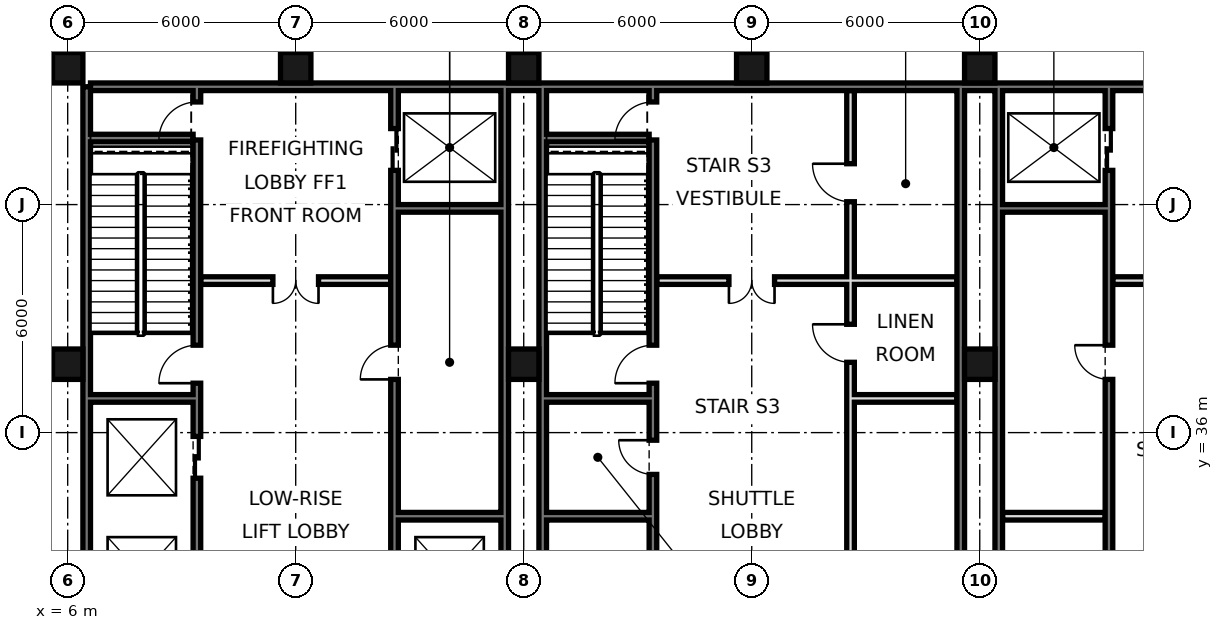
"""IFC4 building model, lengths in metres.
Left out: names, types, materials, properties, quantities, classifications, styles, units other than length and angle.
Written with IfcOpenShell. Run it as: python <this file> out.ifc"""

import sys

from ifc_helpers import new_model, si_unit, direction, frame, frame_2d, origin, origin_2d, place, context, subcontext, project, spatial, rectangle, hollow_rectangle, extrude, element, fill, save


model = new_model("IFC4")
c1 = context("Model", 3, precision=1e-05, world=origin(), true_north=direction((0.0, 1.0)))
c2 = subcontext(c1, "Body", "Model", "MODEL_VIEW")
j1 = project(units=[si_unit("LENGTHUNIT", "METRE"), si_unit("PLANEANGLEUNIT", "RADIAN")], contexts=[c1])
p1 = place(None, origin())
s1 = spatial("IfcSite", under=j1, at=p1, CompositionType="ELEMENT")
p2 = place(p1, origin())
s2 = spatial("IfcBuilding", under=s1, at=p2, CompositionType="ELEMENT")
p3 = place(p2, frame((0.0, 0.0, 44.4)))
s3 = spatial("IfcBuildingStorey", under=s2, at=p3, CompositionType="ELEMENT", Elevation=44.4)
for number, where, z_axis, x_axis in (
    (1, (6.0, 37.8, 0.0), (0.0, 0.0, 1.0), (1.0, 0.0, 0.0)),
    (2, (6.0, 45.6, 0.0), (0.0, 0.0, 1.0), (1.0, 0.0, 0.0)),
    (3, (12.0, 45.6, 0.0), (0.0, 0.0, 1.0), (1.0, 0.0, 0.0)),
    (4, (18.0, 37.8, 0.0), (0.0, 0.0, 1.0), (1.0, 0.0, 0.0)),
    (5, (18.0, 45.6, 0.0), (0.0, 0.0, 1.0), (1.0, 0.0, 0.0)),
    (6, (24.0, 45.6, 0.0), (0.0, 0.0, 1.0), (1.0, 0.0, 0.0)),
    (7, (30.0, 37.8, 0.0), (0.0, 0.0, 1.0), (1.0, 0.0, 0.0)),
    (8, (30.0, 45.6, 0.0), (0.0, 0.0, 1.0), (1.0, 0.0, 0.0)),
):
    element("IfcColumn", number, at=place(p3, frame(where, z_axis=z_axis, x_axis=x_axis)), inside=s3, PredefinedType="COLUMN", context=c2, shape_type="SweptSolid", body=[
        extrude(hollow_rectangle(XDim=0.8, YDim=0.8, WallThickness=0.07, at=origin_2d()), origin(), (0.0, 0.0, 1.0), 5.4),
    ])
p4 = place(p3, frame((5.805, 48.47, 0.0), z_axis=(0.0, 0.0, 1.0), x_axis=(-0.707106781187, -0.707106781187, 0.0)))
e9 = element("IfcWall", 9, at=p4, inside=s3, PredefinedType="SOLIDWALL", context=c2, shape_type="SweptSolid", body=[
    extrude(rectangle(XDim=8.875, YDim=0.3, at=frame_2d((4.438, 0.0))), origin(), (0.0, 0.0, 1.0), 5.22),
])
p5 = place(p4, frame((1.292, 0.0, 0.9)))
e10 = element("IfcOpeningElement", 10, at=p5, cuts=e9, PredefinedType="OPENING", context=c2, shape_type="SweptSolid", body=[
    extrude(rectangle(XDim=1.8, YDim=1.5, at=frame_2d((0.9, 0.75))), frame((0.0, 0.16, 0.0), z_axis=(0.0, -1.0, 0.0), x_axis=(1.0, 0.0, 0.0)), (0.0, 0.0, 1.0), 0.32),
])
p6 = place(p3, frame((6.5, 21.6, 0.0), z_axis=(0.0, 0.0, 1.0), x_axis=(0.0, 1.0, 0.0)))
e11 = element("IfcWall", 11, at=p6, inside=s3, PredefinedType="SOLIDWALL", context=c2, shape_type="SweptSolid", body=[
    extrude(rectangle(XDim=23.5, YDim=0.2, at=frame_2d((11.75, 0.0))), origin(), (0.0, 0.0, 1.0), 5.22),
])
p7 = place(p3, frame((6.6, 45.1, 0.0), z_axis=(0.0, 0.0, 1.0), x_axis=(1.0, 0.0, 0.0)))
e12 = element("IfcWall", 12, at=p7, inside=s3, PredefinedType="SOLIDWALL", context=c2, shape_type="SweptSolid", body=[
    extrude(rectangle(XDim=34.8, YDim=0.2, at=frame_2d((17.4, 0.0))), origin(), (0.0, 0.0, 1.0), 5.22),
])
for number, where, z_axis, x_axis in (
    (13, (17.5, 27.6, 0.0), (0.0, 0.0, 1.0), (0.0, 1.0, 0.0)),
    (14, (18.5, 27.6, 0.0), (0.0, 0.0, 1.0), (0.0, 1.0, 0.0)),
    (15, (29.5, 27.6, 0.0), (0.0, 0.0, 1.0), (0.0, 1.0, 0.0)),
    (16, (30.5, 27.6, 0.0), (0.0, 0.0, 1.0), (0.0, 1.0, 0.0)),
):
    element("IfcWall", number, at=place(p3, frame(where, z_axis=z_axis, x_axis=x_axis)), inside=s3, PredefinedType="SOLIDWALL", context=c2, shape_type="SweptSolid", body=[
        extrude(rectangle(XDim=17.5, YDim=0.2, at=frame_2d((8.75, 0.0))), origin(), (0.0, 0.0, 1.0), 5.22),
    ])
p8 = place(p3, frame((14.6, 27.5, 0.0), z_axis=(0.0, 0.0, 1.0), x_axis=(0.0, 1.0, 0.0)))
e17 = element("IfcWall", 17, at=p8, inside=s3, PredefinedType="SOLIDWALL", context=c2, shape_type="SweptSolid", body=[
    extrude(rectangle(XDim=17.5, YDim=0.2, at=frame_2d((8.75, 0.0))), origin(), (0.0, 0.0, 1.0), 5.22),
])
p9 = place(p8, frame((1.1, 0.0, 0.0)))
e18 = element("IfcOpeningElement", 18, at=p9, cuts=e17, PredefinedType="OPENING", context=c2, shape_type="SweptSolid", body=[
    extrude(rectangle(XDim=1.1, YDim=2.1, at=frame_2d((0.55, 1.05))), frame((0.0, 0.11, 0.0), z_axis=(0.0, -1.0, 0.0), x_axis=(1.0, 0.0, 0.0)), (0.0, 0.0, 1.0), 0.22),
])
p10 = place(p8, frame((4.2, 0.0, 0.0)))
e19 = element("IfcOpeningElement", 19, at=p10, cuts=e17, PredefinedType="OPENING", context=c2, shape_type="SweptSolid", body=[
    extrude(rectangle(XDim=1.1, YDim=2.1, at=frame_2d((0.55, 1.05))), frame((0.0, 0.11, 0.0), z_axis=(0.0, -1.0, 0.0), x_axis=(1.0, 0.0, 0.0)), (0.0, 0.0, 1.0), 0.22),
])
p11 = place(p8, frame((15.4, 0.0, 0.0)))
e20 = element("IfcOpeningElement", 20, at=p11, cuts=e17, PredefinedType="OPENING", context=c2, shape_type="SweptSolid", body=[
    extrude(rectangle(XDim=1.1, YDim=2.1, at=frame_2d((0.55, 1.05))), frame((0.0, 0.11, 0.0), z_axis=(0.0, -1.0, 0.0), x_axis=(1.0, 0.0, 0.0)), (0.0, 0.0, 1.0), 0.22),
])
p12 = place(p8, frame((9.9, 0.0, 0.0)))
e21 = element("IfcOpeningElement", 21, at=p12, cuts=e17, PredefinedType="OPENING", context=c2, shape_type="SweptSolid", body=[
    extrude(rectangle(XDim=0.9, YDim=2.1, at=frame_2d((0.45, 1.05))), frame((0.0, 0.11, 0.0), z_axis=(0.0, -1.0, 0.0), x_axis=(1.0, 0.0, 0.0)), (0.0, 0.0, 1.0), 0.22),
])
p13 = place(p3, frame((21.4, 27.5, 0.0), z_axis=(0.0, 0.0, 1.0), x_axis=(0.0, 1.0, 0.0)))
e22 = element("IfcWall", 22, at=p13, inside=s3, PredefinedType="SOLIDWALL", context=c2, shape_type="SweptSolid", body=[
    extrude(rectangle(XDim=17.5, YDim=0.2, at=frame_2d((8.75, 0.0))), origin(), (0.0, 0.0, 1.0), 5.22),
])
p14 = place(p13, frame((16.2, 0.0, 0.0)))
e23 = element("IfcOpeningElement", 23, at=p14, cuts=e22, PredefinedType="OPENING", context=c2, shape_type="SweptSolid", body=[
    extrude(rectangle(XDim=1.0, YDim=2.1, at=frame_2d((0.5, 1.05))), frame((0.0, 0.11, 0.0), z_axis=(0.0, -1.0, 0.0), x_axis=(1.0, 0.0, 0.0)), (0.0, 0.0, 1.0), 0.22),
])
p15 = place(p13, frame((9.8, 0.0, 0.0)))
e24 = element("IfcOpeningElement", 24, at=p15, cuts=e22, PredefinedType="OPENING", context=c2, shape_type="SweptSolid", body=[
    extrude(rectangle(XDim=1.0, YDim=2.1, at=frame_2d((0.5, 1.05))), frame((0.0, 0.11, 0.0), z_axis=(0.0, -1.0, 0.0), x_axis=(1.0, 0.0, 0.0)), (0.0, 0.0, 1.0), 0.22),
])
p16 = place(p13, frame((7.4, 0.0, 0.0)))
e25 = element("IfcOpeningElement", 25, at=p16, cuts=e22, PredefinedType="OPENING", context=c2, shape_type="SweptSolid", body=[
    extrude(rectangle(XDim=0.9, YDim=2.1, at=frame_2d((0.45, 1.05))), frame((0.0, 0.11, 0.0), z_axis=(0.0, -1.0, 0.0), x_axis=(1.0, 0.0, 0.0)), (0.0, 0.0, 1.0), 0.22),
])
p17 = place(p3, frame((26.6, 27.5, 0.0), z_axis=(0.0, 0.0, 1.0), x_axis=(0.0, 1.0, 0.0)))
e26 = element("IfcWall", 26, at=p17, inside=s3, PredefinedType="SOLIDWALL", context=c2, shape_type="SweptSolid", body=[
    extrude(rectangle(XDim=17.5, YDim=0.2, at=frame_2d((8.75, 0.0))), origin(), (0.0, 0.0, 1.0), 5.22),
])
p18 = place(p17, frame((4.3, 0.0, 0.0)))
e27 = element("IfcOpeningElement", 27, at=p18, cuts=e26, PredefinedType="OPENING", context=c2, shape_type="SweptSolid", body=[
    extrude(rectangle(XDim=0.9, YDim=2.1, at=frame_2d((0.45, 1.05))), frame((0.0, 0.11, 0.0), z_axis=(0.0, -1.0, 0.0), x_axis=(1.0, 0.0, 0.0)), (0.0, 0.0, 1.0), 0.22),
])
p19 = place(p17, frame((10.35, 0.0, 0.0)))
e28 = element("IfcOpeningElement", 28, at=p19, cuts=e26, PredefinedType="OPENING", context=c2, shape_type="SweptSolid", body=[
    extrude(rectangle(XDim=1.0, YDim=2.1, at=frame_2d((0.5, 1.05))), frame((0.0, 0.11, 0.0), z_axis=(0.0, -1.0, 0.0), x_axis=(1.0, 0.0, 0.0)), (0.0, 0.0, 1.0), 0.22),
])
p20 = place(p17, frame((14.575, 0.0, 0.0)))
e29 = element("IfcOpeningElement", 29, at=p20, cuts=e26, PredefinedType="OPENING", context=c2, shape_type="SweptSolid", body=[
    extrude(rectangle(XDim=1.0, YDim=2.1, at=frame_2d((0.5, 1.05))), frame((0.0, 0.11, 0.0), z_axis=(0.0, -1.0, 0.0), x_axis=(1.0, 0.0, 0.0)), (0.0, 0.0, 1.0), 0.22),
])
p21 = place(p3, frame((33.4, 27.5, 0.0), z_axis=(0.0, 0.0, 1.0), x_axis=(0.0, 1.0, 0.0)))
e30 = element("IfcWall", 30, at=p21, inside=s3, PredefinedType="SOLIDWALL", context=c2, shape_type="SweptSolid", body=[
    extrude(rectangle(XDim=17.5, YDim=0.2, at=frame_2d((8.75, 0.0))), origin(), (0.0, 0.0, 1.0), 5.22),
])
p22 = place(p21, frame((15.4, 0.0, 0.0)))
e31 = element("IfcOpeningElement", 31, at=p22, cuts=e30, PredefinedType="OPENING", context=c2, shape_type="SweptSolid", body=[
    extrude(rectangle(XDim=1.1, YDim=2.1, at=frame_2d((0.55, 1.05))), frame((0.0, 0.11, 0.0), z_axis=(0.0, -1.0, 0.0), x_axis=(1.0, 0.0, 0.0)), (0.0, 0.0, 1.0), 0.22),
])
p23 = place(p21, frame((2.7, 0.0, 0.0)))
e32 = element("IfcOpeningElement", 32, at=p23, cuts=e30, PredefinedType="OPENING", context=c2, shape_type="SweptSolid", body=[
    extrude(rectangle(XDim=1.0, YDim=2.1, at=frame_2d((0.5, 1.05))), frame((0.0, 0.11, 0.0), z_axis=(0.0, -1.0, 0.0), x_axis=(1.0, 0.0, 0.0)), (0.0, 0.0, 1.0), 0.22),
])
p24 = place(p21, frame((9.9, 0.0, 0.0)))
e33 = element("IfcOpeningElement", 33, at=p24, cuts=e30, PredefinedType="OPENING", context=c2, shape_type="SweptSolid", body=[
    extrude(rectangle(XDim=0.9, YDim=2.1, at=frame_2d((0.45, 1.05))), frame((0.0, 0.11, 0.0), z_axis=(0.0, -1.0, 0.0), x_axis=(1.0, 0.0, 0.0)), (0.0, 0.0, 1.0), 0.22),
])
p25 = place(p3, frame((9.4, 21.6, 0.0), z_axis=(0.0, 0.0, 1.0), x_axis=(0.0, 1.0, 0.0)))
e34 = element("IfcWall", 34, at=p25, inside=s3, PredefinedType="SOLIDWALL", context=c2, shape_type="SweptSolid", body=[
    extrude(rectangle(XDim=23.4, YDim=0.2, at=frame_2d((11.7, 0.0))), origin(), (0.0, 0.0, 1.0), 5.22),
])
p26 = place(p25, frame((7.0, 0.0, 0.0)))
e35 = element("IfcOpeningElement", 35, at=p26, cuts=e34, PredefinedType="OPENING", context=c2, shape_type="SweptSolid", body=[
    extrude(rectangle(XDim=1.1, YDim=2.1, at=frame_2d((0.55, 1.05))), frame((0.0, 0.11, 0.0), z_axis=(0.0, -1.0, 0.0), x_axis=(1.0, 0.0, 0.0)), (0.0, 0.0, 1.0), 0.22),
])
p27 = place(p25, frame((10.1, 0.0, 0.0)))
e36 = element("IfcOpeningElement", 36, at=p27, cuts=e34, PredefinedType="OPENING", context=c2, shape_type="SweptSolid", body=[
    extrude(rectangle(XDim=1.1, YDim=2.1, at=frame_2d((0.55, 1.05))), frame((0.0, 0.11, 0.0), z_axis=(0.0, -1.0, 0.0), x_axis=(1.0, 0.0, 0.0)), (0.0, 0.0, 1.0), 0.22),
])
p28 = place(p25, frame((13.2, 0.0, 0.0)))
e37 = element("IfcOpeningElement", 37, at=p28, cuts=e34, PredefinedType="OPENING", context=c2, shape_type="SweptSolid", body=[
    extrude(rectangle(XDim=1.1, YDim=2.1, at=frame_2d((0.55, 1.05))), frame((0.0, 0.11, 0.0), z_axis=(0.0, -1.0, 0.0), x_axis=(1.0, 0.0, 0.0)), (0.0, 0.0, 1.0), 0.22),
])
p29 = place(p25, frame((22.1, 0.0, 0.0)))
e38 = element("IfcOpeningElement", 38, at=p29, cuts=e34, PredefinedType="OPENING", context=c2, shape_type="SweptSolid", body=[
    extrude(rectangle(XDim=1.0, YDim=2.1, at=frame_2d((0.5, 1.05))), frame((0.0, 0.11, 0.0), z_axis=(0.0, -1.0, 0.0), x_axis=(1.0, 0.0, 0.0)), (0.0, 0.0, 1.0), 0.22),
])
p30 = place(p25, frame((15.7, 0.0, 0.0)))
e39 = element("IfcOpeningElement", 39, at=p30, cuts=e34, PredefinedType="OPENING", context=c2, shape_type="SweptSolid", body=[
    extrude(rectangle(XDim=1.0, YDim=2.1, at=frame_2d((0.5, 1.05))), frame((0.0, 0.11, 0.0), z_axis=(0.0, -1.0, 0.0), x_axis=(1.0, 0.0, 0.0)), (0.0, 0.0, 1.0), 0.22),
])
p31 = place(p25, frame((0.175, 0.0, 0.0)))
e40 = element("IfcOpeningElement", 40, at=p31, cuts=e34, PredefinedType="OPENING", context=c2, shape_type="SweptSolid", body=[
    extrude(rectangle(XDim=0.9, YDim=2.1, at=frame_2d((0.45, 1.05))), frame((0.0, 0.11, 0.0), z_axis=(0.0, -1.0, 0.0), x_axis=(1.0, 0.0, 0.0)), (0.0, 0.0, 1.0), 0.22),
])
for number, where, z_axis, x_axis in (
    (41, (14.7, 33.8, 0.0), (0.0, 0.0, 1.0), (1.0, 0.0, 0.0)),
    (42, (18.6, 33.8, 0.0), (0.0, 0.0, 1.0), (1.0, 0.0, 0.0)),
    (43, (30.6, 33.8, 0.0), (0.0, 0.0, 1.0), (1.0, 0.0, 0.0)),
    (44, (18.6, 36.9, 0.0), (0.0, 0.0, 1.0), (1.0, 0.0, 0.0)),
    (45, (26.7, 36.9, 0.0), (0.0, 0.0, 1.0), (1.0, 0.0, 0.0)),
    (46, (6.6, 36.9, 0.0), (0.0, 0.0, 1.0), (1.0, 0.0, 0.0)),
):
    element("IfcWall", number, at=place(p3, frame(where, z_axis=z_axis, x_axis=x_axis)), inside=s3, PredefinedType="SOLIDWALL", context=c2, shape_type="SweptSolid", body=[
        extrude(rectangle(XDim=2.7, YDim=0.2, at=frame_2d((1.35, 0.0))), origin(), (0.0, 0.0, 1.0), 5.22),
    ])
p32 = place(p3, frame((21.5, 40.0, 0.0), z_axis=(0.0, 0.0, 1.0), x_axis=(1.0, 0.0, 0.0)))
e47 = element("IfcWall", 47, at=p32, inside=s3, PredefinedType="PARTITIONING", context=c2, shape_type="SweptSolid", body=[
    extrude(rectangle(XDim=7.9, YDim=0.2, at=frame_2d((3.95, 0.0))), origin(), (0.0, 0.0, 1.0), 5.22),
])
p33 = place(p32, frame((1.9, 0.0, 0.0)))
e48 = element("IfcOpeningElement", 48, at=p33, cuts=e47, PredefinedType="OPENING", context=c2, shape_type="SweptSolid", body=[
    extrude(rectangle(XDim=1.2, YDim=2.1, at=frame_2d((0.6, 1.05))), frame((0.0, 0.11, 0.0), z_axis=(0.0, -1.0, 0.0), x_axis=(1.0, 0.0, 0.0)), (0.0, 0.0, 1.0), 0.22),
])
p34 = place(p3, frame((33.5, 40.0, 0.0), z_axis=(0.0, 0.0, 1.0), x_axis=(1.0, 0.0, 0.0)))
e49 = element("IfcWall", 49, at=p34, inside=s3, PredefinedType="PARTITIONING", context=c2, shape_type="SweptSolid", body=[
    extrude(rectangle(XDim=5.0, YDim=0.2, at=frame_2d((2.5, 0.0))), origin(), (0.0, 0.0, 1.0), 5.22),
])
p35 = place(p34, frame((1.9, 0.0, 0.0)))
e50 = element("IfcOpeningElement", 50, at=p35, cuts=e49, PredefinedType="OPENING", context=c2, shape_type="SweptSolid", body=[
    extrude(rectangle(XDim=1.2, YDim=2.1, at=frame_2d((0.6, 1.05))), frame((0.0, 0.11, 0.0), z_axis=(0.0, -1.0, 0.0), x_axis=(1.0, 0.0, 0.0)), (0.0, 0.0, 1.0), 0.22),
])
p36 = place(p3, frame((9.5, 40.0, 0.0), z_axis=(0.0, 0.0, 1.0), x_axis=(1.0, 0.0, 0.0)))
e51 = element("IfcWall", 51, at=p36, inside=s3, PredefinedType="PARTITIONING", context=c2, shape_type="SweptSolid", body=[
    extrude(rectangle(XDim=5.0, YDim=0.2, at=frame_2d((2.5, 0.0))), origin(), (0.0, 0.0, 1.0), 5.22),
])
p37 = place(p36, frame((1.9, 0.0, 0.0)))
e52 = element("IfcOpeningElement", 52, at=p37, cuts=e51, PredefinedType="OPENING", context=c2, shape_type="SweptSolid", body=[
    extrude(rectangle(XDim=1.2, YDim=2.1, at=frame_2d((0.6, 1.05))), frame((0.0, 0.11, 0.0), z_axis=(0.0, -1.0, 0.0), x_axis=(1.0, 0.0, 0.0)), (0.0, 0.0, 1.0), 0.22),
])
for number, where, z_axis, x_axis in (
    (53, (14.7, 41.9, 0.0), (0.0, 0.0, 1.0), (1.0, 0.0, 0.0)),
    (54, (30.6, 41.9, 0.0), (0.0, 0.0, 1.0), (1.0, 0.0, 0.0)),
):
    element("IfcWall", number, at=place(p3, frame(where, z_axis=z_axis, x_axis=x_axis)), inside=s3, PredefinedType="SOLIDWALL", context=c2, shape_type="SweptSolid", body=[
        extrude(rectangle(XDim=2.7, YDim=0.2, at=frame_2d((1.35, 0.0))), origin(), (0.0, 0.0, 1.0), 5.22),
    ])
for number, where, z_axis, x_axis in (
    (55, (18.6, 43.75, 0.0), (0.0, 0.0, 1.0), (1.0, 0.0, 0.0)),
    (56, (6.6, 43.75, 0.0), (0.0, 0.0, 1.0), (1.0, 0.0, 0.0)),
):
    element("IfcWall", number, at=place(p3, frame(where, z_axis=z_axis, x_axis=x_axis)), inside=s3, PredefinedType="SOLIDWALL", context=c2, shape_type="SweptSolid", body=[
        extrude(rectangle(XDim=2.7, YDim=0.2, at=frame_2d((1.35, 0.0))), origin(), (0.0, 0.0, 1.0), 2.5),
    ])
p38 = place(p37, frame((1.2, 0.0, 0.0), z_axis=(0.0, 0.0, 1.0), x_axis=(-1.0, 0.0, 0.0)))
e57 = element("IfcDoor", 57, at=p38, inside=s3, OperationType="DOUBLE_DOOR_SINGLE_SWING", PredefinedType="DOOR", context=c2, shape_type="SweptSolid", body=[
    extrude(rectangle(XDim=1.2, YDim=2.1, at=frame_2d((0.6, 1.05))), frame((0.0, 0.025, 0.0), z_axis=(0.0, -1.0, 0.0), x_axis=(1.0, 0.0, 0.0)), (0.0, 0.0, 1.0), 0.05),
])
fill(e52, e57)
p39 = place(p33, frame((1.2, 0.0, 0.0), z_axis=(0.0, 0.0, 1.0), x_axis=(-1.0, 0.0, 0.0)))
e58 = element("IfcDoor", 58, at=p39, inside=s3, OperationType="DOUBLE_DOOR_SINGLE_SWING", PredefinedType="DOOR", context=c2, shape_type="SweptSolid", body=[
    extrude(rectangle(XDim=1.2, YDim=2.1, at=frame_2d((0.6, 1.05))), frame((0.0, 0.025, 0.0), z_axis=(0.0, -1.0, 0.0), x_axis=(1.0, 0.0, 0.0)), (0.0, 0.0, 1.0), 0.05),
])
fill(e48, e58)
p40 = place(p22, origin())
e59 = element("IfcDoor", 59, at=p40, inside=s3, OperationType="DOUBLE_DOOR_SLIDING", PredefinedType="DOOR", context=c2, shape_type="SweptSolid", body=[
    extrude(rectangle(XDim=1.1, YDim=2.1, at=frame_2d((0.55, 1.05))), frame((0.0, 0.025, 0.0), z_axis=(0.0, -1.0, 0.0), x_axis=(1.0, 0.0, 0.0)), (0.0, 0.0, 1.0), 0.05),
])
fill(e31, e59)
p41 = place(p11, origin())
e60 = element("IfcDoor", 60, at=p41, inside=s3, OperationType="DOUBLE_DOOR_SLIDING", PredefinedType="DOOR", context=c2, shape_type="SweptSolid", body=[
    extrude(rectangle(XDim=1.1, YDim=2.1, at=frame_2d((0.55, 1.05))), frame((0.0, 0.025, 0.0), z_axis=(0.0, -1.0, 0.0), x_axis=(1.0, 0.0, 0.0)), (0.0, 0.0, 1.0), 0.05),
])
fill(e20, e60)
p42 = place(p28, origin())
e61 = element("IfcDoor", 61, at=p42, inside=s3, OperationType="DOUBLE_DOOR_SLIDING", PredefinedType="DOOR", context=c2, shape_type="SweptSolid", body=[
    extrude(rectangle(XDim=1.1, YDim=2.1, at=frame_2d((0.55, 1.05))), frame((0.0, 0.025, 0.0), z_axis=(0.0, -1.0, 0.0), x_axis=(1.0, 0.0, 0.0)), (0.0, 0.0, 1.0), 0.05),
])
fill(e37, e61)
p43 = place(p29, origin())
e62 = element("IfcDoor", 62, at=p43, inside=s3, OperationType="SINGLE_SWING_LEFT", PredefinedType="DOOR", context=c2, shape_type="SweptSolid", body=[
    extrude(rectangle(XDim=1.0, YDim=2.1, at=frame_2d((0.5, 1.05))), frame((0.0, 0.025, 0.0), z_axis=(0.0, -1.0, 0.0), x_axis=(1.0, 0.0, 0.0)), (0.0, 0.0, 1.0), 0.05),
])
fill(e38, e62)
p44 = place(p30, origin())
e63 = element("IfcDoor", 63, at=p44, inside=s3, OperationType="SINGLE_SWING_LEFT", PredefinedType="DOOR", context=c2, shape_type="SweptSolid", body=[
    extrude(rectangle(XDim=1.0, YDim=2.1, at=frame_2d((0.5, 1.05))), frame((0.0, 0.025, 0.0), z_axis=(0.0, -1.0, 0.0), x_axis=(1.0, 0.0, 0.0)), (0.0, 0.0, 1.0), 0.05),
])
fill(e39, e63)
p45 = place(p14, origin())
e64 = element("IfcDoor", 64, at=p45, inside=s3, OperationType="SINGLE_SWING_LEFT", PredefinedType="DOOR", context=c2, shape_type="SweptSolid", body=[
    extrude(rectangle(XDim=1.0, YDim=2.1, at=frame_2d((0.5, 1.05))), frame((0.0, 0.025, 0.0), z_axis=(0.0, -1.0, 0.0), x_axis=(1.0, 0.0, 0.0)), (0.0, 0.0, 1.0), 0.05),
])
fill(e23, e64)
p46 = place(p15, origin())
e65 = element("IfcDoor", 65, at=p46, inside=s3, OperationType="SINGLE_SWING_LEFT", PredefinedType="DOOR", context=c2, shape_type="SweptSolid", body=[
    extrude(rectangle(XDim=1.0, YDim=2.1, at=frame_2d((0.5, 1.05))), frame((0.0, 0.025, 0.0), z_axis=(0.0, -1.0, 0.0), x_axis=(1.0, 0.0, 0.0)), (0.0, 0.0, 1.0), 0.05),
])
fill(e24, e65)
p47 = place(p12, origin())
e66 = element("IfcDoor", 66, at=p47, inside=s3, OperationType="SINGLE_SWING_LEFT", PredefinedType="DOOR", context=c2, shape_type="SweptSolid", body=[
    extrude(rectangle(XDim=0.9, YDim=2.1, at=frame_2d((0.45, 1.05))), frame((0.0, 0.025, 0.0), z_axis=(0.0, -1.0, 0.0), x_axis=(1.0, 0.0, 0.0)), (0.0, 0.0, 1.0), 0.05),
])
fill(e21, e66)
p48 = place(p24, frame((0.9, 0.0, 0.0), z_axis=(0.0, 0.0, 1.0), x_axis=(-1.0, 0.0, 0.0)))
e67 = element("IfcDoor", 67, at=p48, inside=s3, OperationType="SINGLE_SWING_LEFT", PredefinedType="DOOR", context=c2, shape_type="SweptSolid", body=[
    extrude(rectangle(XDim=0.9, YDim=2.1, at=frame_2d((0.45, 1.05))), frame((0.0, 0.025, 0.0), z_axis=(0.0, -1.0, 0.0), x_axis=(1.0, 0.0, 0.0)), (0.0, 0.0, 1.0), 0.05),
])
fill(e33, e67)
p49 = place(p16, frame((0.9, 0.0, 0.0), z_axis=(0.0, 0.0, 1.0), x_axis=(-1.0, 0.0, 0.0)))
e68 = element("IfcDoor", 68, at=p49, inside=s3, OperationType="SINGLE_SWING_LEFT", PredefinedType="DOOR", context=c2, shape_type="SweptSolid", body=[
    extrude(rectangle(XDim=0.9, YDim=2.1, at=frame_2d((0.45, 1.05))), frame((0.0, 0.025, 0.0), z_axis=(0.0, -1.0, 0.0), x_axis=(1.0, 0.0, 0.0)), (0.0, 0.0, 1.0), 0.05),
])
fill(e25, e68)
p50 = place(p19, frame((1.0, 0.0, 0.0), z_axis=(0.0, 0.0, 1.0), x_axis=(-1.0, 0.0, 0.0)))
e69 = element("IfcDoor", 69, at=p50, inside=s3, OperationType="SINGLE_SWING_LEFT", PredefinedType="DOOR", context=c2, shape_type="SweptSolid", body=[
    extrude(rectangle(XDim=1.0, YDim=2.1, at=frame_2d((0.5, 1.05))), frame((0.0, 0.025, 0.0), z_axis=(0.0, -1.0, 0.0), x_axis=(1.0, 0.0, 0.0)), (0.0, 0.0, 1.0), 0.05),
])
fill(e28, e69)
p51 = place(p20, frame((1.0, 0.0, 0.0), z_axis=(0.0, 0.0, 1.0), x_axis=(-1.0, 0.0, 0.0)))
e70 = element("IfcDoor", 70, at=p51, inside=s3, OperationType="SINGLE_SWING_LEFT", PredefinedType="DOOR", context=c2, shape_type="SweptSolid", body=[
    extrude(rectangle(XDim=1.0, YDim=2.1, at=frame_2d((0.5, 1.05))), frame((0.0, 0.025, 0.0), z_axis=(0.0, -1.0, 0.0), x_axis=(1.0, 0.0, 0.0)), (0.0, 0.0, 1.0), 0.05),
])
fill(e29, e70)
save(model, sys.argv[1])
